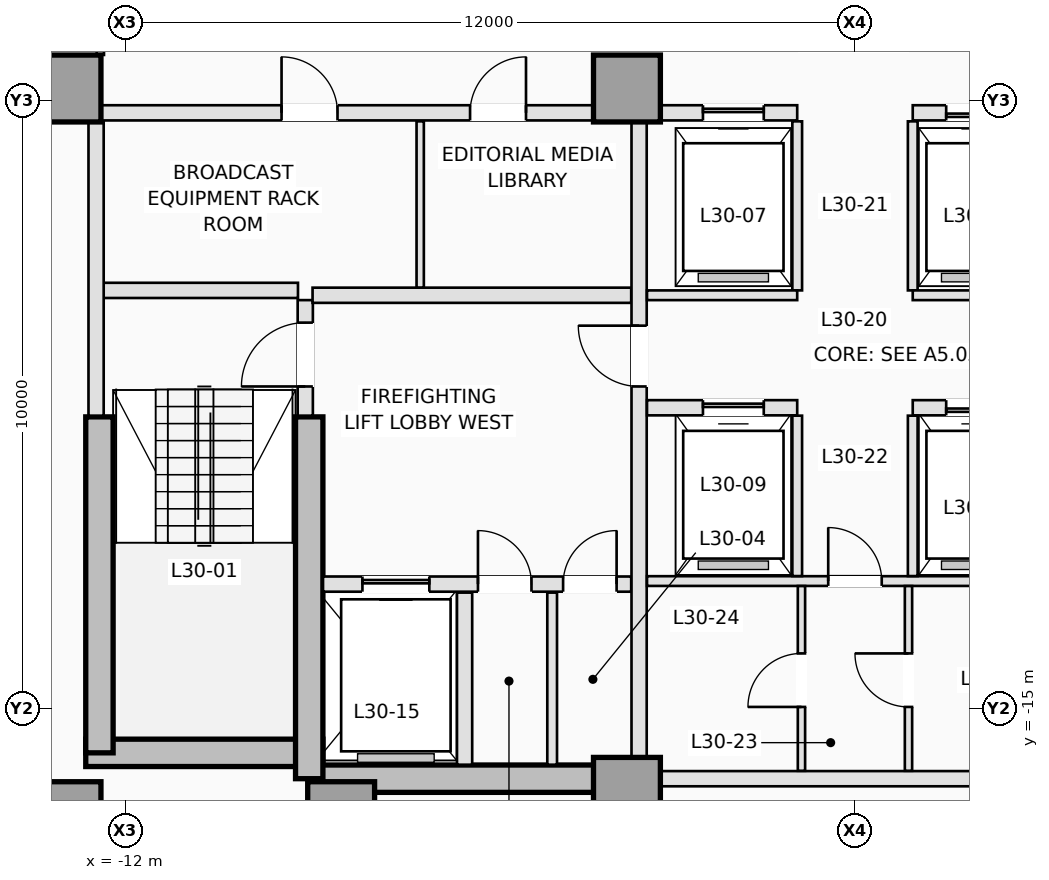
"""IFC4 building model, lengths in metres.
Left out: names, types, materials, properties, quantities, classifications, styles, units other than length and angle.
Written with IfcOpenShell. Run it as: python <this file> out.ifc"""

import sys

from ifc_helpers import new_model, si_unit, direction, frame, frame_2d, origin, origin_2d, place, context, subcontext, project, spatial, rectangle, extrude, element, fill, save


model = new_model("IFC4")
c1 = context("Model", 3, precision=1e-05, world=origin(), true_north=direction((0.0, 1.0)))
c2 = subcontext(c1, "Body", "Model", "MODEL_VIEW")
j1 = project(units=[si_unit("LENGTHUNIT", "METRE"), si_unit("PLANEANGLEUNIT", "RADIAN")], contexts=[c1])
p1 = place(None, origin())
s1 = spatial("IfcSite", under=j1, at=p1, CompositionType="ELEMENT")
p2 = place(p1, origin())
s2 = spatial("IfcBuilding", under=s1, at=p2, CompositionType="ELEMENT")
p3 = place(p2, frame((0.0, 0.0, 112.5)))
s3 = spatial("IfcBuildingStorey", under=s2, at=p3, CompositionType="ELEMENT", Elevation=112.5)
p4 = place(p3, frame((-12.65, -15.725, 0.0), z_axis=(0.0, 0.0, 1.0), x_axis=(1.0, 0.0, 0.0)))
e1 = element("IfcWall", 1, at=p4, inside=s3, PredefinedType="SHEAR", context=c2, shape_type="SweptSolid", body=[
    extrude(rectangle(XDim=3.9, YDim=0.45, at=frame_2d((1.95, 0.0))), origin(), (0.0, 0.0, 1.0), 3.5),
])
p5 = place(p3, frame((-8.975, -16.15, 0.0), z_axis=(0.0, 0.0, 1.0), x_axis=(1.0, 0.0, 0.0)))
e2 = element("IfcWall", 2, at=p5, inside=s3, PredefinedType="SHEAR", context=c2, shape_type="SweptSolid", body=[
    extrude(rectangle(XDim=5.225, YDim=0.45, at=frame_2d((2.613, 0.0))), origin(), (0.0, 0.0, 1.0), 3.5),
])
p6 = place(p3, frame((-12.425, -15.725, 0.0), z_axis=(0.0, 0.0, 1.0), x_axis=(0.0, 1.0, 0.0)))
e3 = element("IfcWall", 3, at=p6, inside=s3, PredefinedType="SHEAR", context=c2, shape_type="SweptSolid", body=[
    extrude(rectangle(XDim=5.525, YDim=0.45, at=frame_2d((2.763, 0.0))), origin(), (0.0, 0.0, 1.0), 3.5),
])
p7 = place(p3, frame((-8.975, -16.15, 0.0), z_axis=(0.0, 0.0, 1.0), x_axis=(0.0, 1.0, 0.0)))
e4 = element("IfcWall", 4, at=p7, inside=s3, PredefinedType="SHEAR", context=c2, shape_type="SweptSolid", body=[
    extrude(rectangle(XDim=5.95, YDim=0.45, at=frame_2d((2.975, 0.0))), origin(), (0.0, 0.0, 1.0), 3.5),
])
for number, where, z_axis, x_axis in (
    (5, (-12.95, -16.75, 0.0), (0.0, 0.0, 1.0), (1.0, 0.0, 0.0)),
    (6, (-8.45, -16.75, 0.0), (0.0, 0.0, 1.0), (1.0, 0.0, 0.0)),
    (7, (-3.75, -16.35, 0.0), (0.0, 0.0, 1.0), (1.0, 0.0, 0.0)),
    (8, (-12.95, -4.8, 0.0), (0.0, 0.0, 1.0), (1.0, 0.0, 0.0)),
    (9, (-3.75, -4.8, 0.0), (0.0, 0.0, 1.0), (1.0, 0.0, 0.0)),
):
    element("IfcColumn", number, at=place(p3, frame(where, z_axis=z_axis, x_axis=x_axis)), inside=s3, PredefinedType="COLUMN", context=c2, shape_type="SweptSolid", body=[
        extrude(rectangle(XDim=1.1, YDim=1.1, at=origin_2d()), origin(), (0.0, 0.0, 1.0), 3.5),
    ])
p8 = place(p3, frame((-9.04, -10.18, 0.0), z_axis=(0.0, 0.0, 1.0), x_axis=(0.0, 1.0, 0.0)))
e10 = element("IfcWall", 10, at=p8, inside=s3, PredefinedType="PARTITIONING", context=c2, shape_type="SweptSolid", body=[
    extrude(rectangle(XDim=1.9, YDim=0.25, at=frame_2d((0.95, 0.0))), origin(), (0.0, 0.0, 1.0), 3.25),
])
p9 = place(p8, frame((0.48, 0.0, 0.0)))
e11 = element("IfcOpeningElement", 11, at=p9, cuts=e10, PredefinedType="OPENING", context=c2, shape_type="SweptSolid", body=[
    extrude(rectangle(XDim=1.05, YDim=2.15, at=frame_2d((0.525, 1.075))), frame((0.0, 0.135, 0.0), z_axis=(0.0, -1.0, 0.0), x_axis=(1.0, 0.0, 0.0)), (0.0, 0.0, 1.0), 0.27),
])
p10 = place(p3, frame((-12.38, -8.12, 0.0), z_axis=(0.0, 0.0, 1.0), x_axis=(1.0, 0.0, 0.0)))
e12 = element("IfcWall", 12, at=p10, inside=s3, PredefinedType="PARTITIONING", context=c2, shape_type="SweptSolid", body=[
    extrude(rectangle(XDim=3.22, YDim=0.25, at=frame_2d((1.61, 0.0))), origin(), (0.0, 0.0, 1.0), 3.25),
])
p11 = place(p3, frame((-12.48, -10.18, 0.0), z_axis=(0.0, 0.0, 1.0), x_axis=(0.0, 1.0, 0.0)))
e13 = element("IfcWall", 13, at=p11, inside=s3, PredefinedType="PARTITIONING", context=c2, shape_type="SweptSolid", body=[
    extrude(rectangle(XDim=4.828, YDim=0.25, at=frame_2d((2.414, 0.0))), origin(), (0.0, 0.0, 1.0), 3.25),
])
p12 = place(p3, frame((-8.748, -12.95, 0.0), z_axis=(0.0, 0.0, 1.0), x_axis=(1.0, 0.0, 0.0)))
e14 = element("IfcWall", 14, at=p12, inside=s3, PredefinedType="PARTITIONING", context=c2, shape_type="SweptSolid", body=[
    extrude(rectangle(XDim=5.068, YDim=0.25, at=frame_2d((2.534, 0.0))), origin(), (0.0, 0.0, 1.0), 3.25),
])
p13 = place(p12, frame((0.648, 0.0, 0.0)))
e15 = element("IfcOpeningElement", 15, at=p13, cuts=e14, PredefinedType="OPENING", context=c2, shape_type="SweptSolid", body=[
    extrude(rectangle(XDim=1.1, YDim=2.15, at=frame_2d((0.55, 1.075))), frame((0.0, 0.135, 0.0), z_axis=(0.0, -1.0, 0.0), x_axis=(1.0, 0.0, 0.0)), (0.0, 0.0, 1.0), 0.27),
])
p14 = place(p12, frame((2.548, 0.0, 0.0)))
e16 = element("IfcOpeningElement", 16, at=p14, cuts=e14, PredefinedType="OPENING", context=c2, shape_type="SweptSolid", body=[
    extrude(rectangle(XDim=0.88, YDim=2.1, at=frame_2d((0.44, 1.05))), frame((0.0, 0.135, 0.0), z_axis=(0.0, -1.0, 0.0), x_axis=(1.0, 0.0, 0.0)), (0.0, 0.0, 1.0), 0.27),
])
p15 = place(p12, frame((3.948, 0.0, 0.0)))
e17 = element("IfcOpeningElement", 17, at=p15, cuts=e14, PredefinedType="OPENING", context=c2, shape_type="SweptSolid", body=[
    extrude(rectangle(XDim=0.88, YDim=2.1, at=frame_2d((0.44, 1.05))), frame((0.0, 0.135, 0.0), z_axis=(0.0, -1.0, 0.0), x_axis=(1.0, 0.0, 0.0)), (0.0, 0.0, 1.0), 0.27),
])
p16 = place(p3, frame((-6.42, -15.92, 0.0), z_axis=(0.0, 0.0, 1.0), x_axis=(0.0, 1.0, 0.0)))
e18 = element("IfcWall", 18, at=p16, inside=s3, PredefinedType="PARTITIONING", context=c2, shape_type="SweptSolid", body=[
    extrude(rectangle(XDim=2.83, YDim=0.25, at=frame_2d((1.415, 0.0))), origin(), (0.0, 0.0, 1.0), 3.25),
])
p17 = place(p3, frame((-4.98, -15.92, 0.0), z_axis=(0.0, 0.0, 1.0), x_axis=(0.0, 1.0, 0.0)))
e19 = element("IfcWall", 19, at=p17, inside=s3, PredefinedType="PARTITIONING", context=c2, shape_type="SweptSolid", body=[
    extrude(rectangle(XDim=2.83, YDim=0.16, at=frame_2d((1.415, 0.0))), origin(), (0.0, 0.0, 1.0), 3.25),
])
p18 = place(p3, frame((-8.92, -8.2, 0.0), z_axis=(0.0, 0.0, 1.0), x_axis=(1.0, 0.0, 0.0)))
e20 = element("IfcWall", 20, at=p18, inside=s3, PredefinedType="PARTITIONING", context=c2, shape_type="SweptSolid", body=[
    extrude(rectangle(XDim=5.24, YDim=0.25, at=frame_2d((2.62, 0.0))), origin(), (0.0, 0.0, 1.0), 3.25),
])
p19 = place(p3, frame((-3.55, -15.798, 0.0), z_axis=(0.0, 0.0, 1.0), x_axis=(0.0, 1.0, 0.0)))
e21 = element("IfcWall", 21, at=p19, inside=s3, PredefinedType="PARTITIONING", context=c2, shape_type="SweptSolid", body=[
    extrude(rectangle(XDim=10.446, YDim=0.25, at=frame_2d((5.223, 0.0))), origin(), (0.0, 0.0, 1.0), 3.25),
])
p20 = place(p19, frame((6.098, 0.0, 0.0)))
e22 = element("IfcOpeningElement", 22, at=p20, cuts=e21, PredefinedType="OPENING", context=c2, shape_type="SweptSolid", body=[
    extrude(rectangle(XDim=1.0, YDim=2.15, at=frame_2d((0.5, 1.075))), frame((0.0, 0.135, 0.0), z_axis=(0.0, -1.0, 0.0), x_axis=(1.0, 0.0, 0.0)), (0.0, 0.0, 1.0), 0.27),
])
p21 = place(p3, frame((-12.398, -5.2, 0.0), z_axis=(0.0, 0.0, 1.0), x_axis=(1.0, 0.0, 0.0)))
e23 = element("IfcWall", 23, at=p21, inside=s3, PredefinedType="PARTITIONING", context=c2, shape_type="SweptSolid", body=[
    extrude(rectangle(XDim=8.096, YDim=0.25, at=frame_2d((4.048, 0.0))), origin(), (0.0, 0.0, 1.0), 3.25),
])
p22 = place(p21, frame((2.968, 0.0, 0.0)))
e24 = element("IfcOpeningElement", 24, at=p22, cuts=e23, PredefinedType="OPENING", context=c2, shape_type="SweptSolid", body=[
    extrude(rectangle(XDim=0.92, YDim=2.12, at=frame_2d((0.46, 1.06))), frame((0.0, 0.135, 0.0), z_axis=(0.0, -1.0, 0.0), x_axis=(1.0, 0.0, 0.0)), (0.0, 0.0, 1.0), 0.27),
])
p23 = place(p21, frame((6.068, 0.0, 0.0)))
e25 = element("IfcOpeningElement", 25, at=p23, cuts=e23, PredefinedType="OPENING", context=c2, shape_type="SweptSolid", body=[
    extrude(rectangle(XDim=0.92, YDim=2.12, at=frame_2d((0.46, 1.06))), frame((0.0, 0.135, 0.0), z_axis=(0.0, -1.0, 0.0), x_axis=(1.0, 0.0, 0.0)), (0.0, 0.0, 1.0), 0.27),
])
p24 = place(p3, frame((-3.198, -5.2, 0.0), z_axis=(0.0, 0.0, 1.0), x_axis=(1.0, 0.0, 0.0)))
e26 = element("IfcWall", 26, at=p24, inside=s3, PredefinedType="PARTITIONING", context=c2, shape_type="SweptSolid", body=[
    extrude(rectangle(XDim=2.248, YDim=0.25, at=frame_2d((1.124, 0.0))), origin(), (0.0, 0.0, 1.0), 3.25),
])
p25 = place(p24, frame((0.698, 0.0, 0.0)))
e27 = element("IfcOpeningElement", 27, at=p25, cuts=e26, PredefinedType="OPENING", context=c2, shape_type="SweptSolid", body=[
    extrude(rectangle(XDim=1.0, YDim=2.15, at=frame_2d((0.5, 1.075))), frame((0.0, 0.135, 0.0), z_axis=(0.0, -1.0, 0.0), x_axis=(1.0, 0.0, 0.0)), (0.0, 0.0, 1.0), 0.27),
])
p26 = place(p3, frame((0.95, -5.2, 0.0), z_axis=(0.0, 0.0, 1.0), x_axis=(1.0, 0.0, 0.0)))
e28 = element("IfcWall", 28, at=p26, inside=s3, PredefinedType="PARTITIONING", context=c2, shape_type="SweptSolid", body=[
    extrude(rectangle(XDim=2.248, YDim=0.25, at=frame_2d((1.124, 0.0))), origin(), (0.0, 0.0, 1.0), 3.25),
])
p27 = place(p26, frame((0.55, 0.0, 0.0)))
e29 = element("IfcOpeningElement", 29, at=p27, cuts=e28, PredefinedType="OPENING", context=c2, shape_type="SweptSolid", body=[
    extrude(rectangle(XDim=1.0, YDim=2.15, at=frame_2d((0.5, 1.075))), frame((0.0, 0.135, 0.0), z_axis=(0.0, -1.0, 0.0), x_axis=(1.0, 0.0, 0.0)), (0.0, 0.0, 1.0), 0.27),
])
p28 = place(p3, frame((-7.15, -8.073, 0.0), z_axis=(0.0, 0.0, 1.0), x_axis=(0.0, 1.0, 0.0)))
e30 = element("IfcWall", 30, at=p28, inside=s3, PredefinedType="PARTITIONING", context=c2, shape_type="SweptSolid", body=[
    extrude(rectangle(XDim=2.733, YDim=0.12, at=frame_2d((1.366, 0.0))), origin(), (0.0, 0.0, 1.0), 3.25),
])
p29 = place(p3, frame((-3.198, -16.15, 0.0), z_axis=(0.0, 0.0, 1.0), x_axis=(1.0, 0.0, 0.0)))
e31 = element("IfcWall", 31, at=p29, inside=s3, PredefinedType="PARTITIONING", context=c2, shape_type="SweptSolid", body=[
    extrude(rectangle(XDim=6.396, YDim=0.25, at=frame_2d((3.198, 0.0))), origin(), (0.0, 0.0, 1.0), 2.3),
])
for number, where, z_axis, x_axis in (
    (32, (-0.95, -8.12, 0.0), (0.0, 0.0, 1.0), (0.0, 1.0, 0.0)),
    (33, (0.95, -8.12, 0.0), (0.0, 0.0, 1.0), (0.0, 1.0, 0.0)),
):
    element("IfcWall", number, at=place(p3, frame(where, z_axis=z_axis, x_axis=x_axis)), inside=s3, PredefinedType="PARTITIONING", context=c2, shape_type="SweptSolid", body=[
        extrude(rectangle(XDim=2.78, YDim=0.16, at=frame_2d((1.39, 0.0))), origin(), (0.0, 0.0, 1.0), 3.25),
    ])
for number, where, z_axis, x_axis in (
    (34, (-3.42, -8.2, 0.0), (0.0, 0.0, 1.0), (1.0, 0.0, 0.0)),
    (35, (0.95, -8.2, 0.0), (0.0, 0.0, 1.0), (1.0, 0.0, 0.0)),
):
    element("IfcWall", number, at=place(p3, frame(where, z_axis=z_axis, x_axis=x_axis)), inside=s3, PredefinedType="PARTITIONING", context=c2, shape_type="SweptSolid", body=[
        extrude(rectangle(XDim=2.47, YDim=0.16, at=frame_2d((1.235, 0.0))), origin(), (0.0, 0.0, 1.0), 3.25),
    ])
p30 = place(p3, frame((-3.42, -10.05, 0.0), z_axis=(0.0, 0.0, 1.0), x_axis=(1.0, 0.0, 0.0)))
e36 = element("IfcWall", 36, at=p30, inside=s3, PredefinedType="PARTITIONING", context=c2, shape_type="SweptSolid", body=[
    extrude(rectangle(XDim=2.47, YDim=0.25, at=frame_2d((1.235, 0.0))), origin(), (0.0, 0.0, 1.0), 3.25),
])
p31 = place(p30, frame((0.92, 0.0, 0.0)))
e37 = element("IfcOpeningElement", 37, at=p31, cuts=e36, PredefinedType="OPENING", context=c2, shape_type="SweptSolid", body=[
    extrude(rectangle(XDim=1.0, YDim=2.15, at=frame_2d((0.5, 1.075))), frame((0.0, 0.135, 0.0), z_axis=(0.0, -1.0, 0.0), x_axis=(1.0, 0.0, 0.0)), (0.0, 0.0, 1.0), 0.27),
])
p32 = place(p3, frame((0.95, -10.05, 0.0), z_axis=(0.0, 0.0, 1.0), x_axis=(1.0, 0.0, 0.0)))
e38 = element("IfcWall", 38, at=p32, inside=s3, PredefinedType="PARTITIONING", context=c2, shape_type="SweptSolid", body=[
    extrude(rectangle(XDim=2.47, YDim=0.25, at=frame_2d((1.235, 0.0))), origin(), (0.0, 0.0, 1.0), 3.25),
])
p33 = place(p32, frame((0.55, 0.0, 0.0)))
e39 = element("IfcOpeningElement", 39, at=p33, cuts=e38, PredefinedType="OPENING", context=c2, shape_type="SweptSolid", body=[
    extrude(rectangle(XDim=1.0, YDim=2.15, at=frame_2d((0.5, 1.075))), frame((0.0, 0.135, 0.0), z_axis=(0.0, -1.0, 0.0), x_axis=(1.0, 0.0, 0.0)), (0.0, 0.0, 1.0), 0.27),
])
p34 = place(p3, frame((-3.42, -12.9, 0.0), z_axis=(0.0, 0.0, 1.0), x_axis=(1.0, 0.0, 0.0)))
e40 = element("IfcWall", 40, at=p34, inside=s3, PredefinedType="PARTITIONING", context=c2, shape_type="SweptSolid", body=[
    extrude(rectangle(XDim=6.84, YDim=0.16, at=frame_2d((3.42, 0.0))), origin(), (0.0, 0.0, 1.0), 3.25),
])
p35 = place(p34, frame((2.98, 0.0, 0.0)))
e41 = element("IfcOpeningElement", 41, at=p35, cuts=e40, PredefinedType="OPENING", context=c2, shape_type="SweptSolid", body=[
    extrude(rectangle(XDim=0.88, YDim=2.12, at=frame_2d((0.44, 1.06))), frame((0.0, 0.09, 0.0), z_axis=(0.0, -1.0, 0.0), x_axis=(1.0, 0.0, 0.0)), (0.0, 0.0, 1.0), 0.18),
])
for number, where, z_axis, x_axis in (
    (42, (-0.95, -12.818, 0.0), (0.0, 0.0, 1.0), (0.0, 1.0, 0.0)),
    (43, (0.95, -12.818, 0.0), (0.0, 0.0, 1.0), (0.0, 1.0, 0.0)),
):
    element("IfcWall", number, at=place(p3, frame(where, z_axis=z_axis, x_axis=x_axis)), inside=s3, PredefinedType="PARTITIONING", context=c2, shape_type="SweptSolid", body=[
        extrude(rectangle(XDim=2.638, YDim=0.16, at=frame_2d((1.319, 0.0))), origin(), (0.0, 0.0, 1.0), 3.25),
    ])
p36 = place(p3, frame((-0.88, -16.02, 0.0), z_axis=(0.0, 0.0, 1.0), x_axis=(0.0, 1.0, 0.0)))
e44 = element("IfcWall", 44, at=p36, inside=s3, PredefinedType="PARTITIONING", context=c2, shape_type="SweptSolid", body=[
    extrude(rectangle(XDim=3.038, YDim=0.12, at=frame_2d((1.519, 0.0))), origin(), (0.0, 0.0, 1.0), 3.25),
])
p37 = place(p36, frame((1.05, 0.0, 0.0)))
e45 = element("IfcOpeningElement", 45, at=p37, cuts=e44, PredefinedType="OPENING", context=c2, shape_type="SweptSolid", body=[
    extrude(rectangle(XDim=0.88, YDim=2.12, at=frame_2d((0.44, 1.06))), frame((0.0, 0.07, 0.0), z_axis=(0.0, -1.0, 0.0), x_axis=(1.0, 0.0, 0.0)), (0.0, 0.0, 1.0), 0.14),
])
p38 = place(p3, frame((0.88, -16.02, 0.0), z_axis=(0.0, 0.0, 1.0), x_axis=(0.0, 1.0, 0.0)))
e46 = element("IfcWall", 46, at=p38, inside=s3, PredefinedType="PARTITIONING", context=c2, shape_type="SweptSolid", body=[
    extrude(rectangle(XDim=3.038, YDim=0.12, at=frame_2d((1.519, 0.0))), origin(), (0.0, 0.0, 1.0), 3.25),
])
p39 = place(p38, frame((1.05, 0.0, 0.0)))
e47 = element("IfcOpeningElement", 47, at=p39, cuts=e46, PredefinedType="OPENING", context=c2, shape_type="SweptSolid", body=[
    extrude(rectangle(XDim=0.88, YDim=2.12, at=frame_2d((0.44, 1.06))), frame((0.0, 0.07, 0.0), z_axis=(0.0, -1.0, 0.0), x_axis=(1.0, 0.0, 0.0)), (0.0, 0.0, 1.0), 0.14),
])
p40 = place(p3, frame((-12.41, -4.248, 0.0), z_axis=(0.0, 0.0, 1.0), x_axis=(0.0, 1.0, 0.0)))
e48 = element("IfcWall", 48, at=p40, inside=s3, PredefinedType="PARTITIONING", context=c2, shape_type="SweptSolid", body=[
    extrude(rectangle(XDim=1.848, YDim=0.12, at=frame_2d((0.924, 0.0))), origin(), (0.0, 0.0, 1.0), 3.25),
])
p41 = place(p25, origin())
e49 = element("IfcDoor", 49, at=p41, inside=s3, OperationType="SLIDING_TO_LEFT", PredefinedType="DOOR", context=c2, shape_type="SweptSolid", body=[
    extrude(rectangle(XDim=1.0, YDim=2.15, at=frame_2d((0.5, 1.075))), frame((0.0, 0.025, 0.0), z_axis=(0.0, -1.0, 0.0), x_axis=(1.0, 0.0, 0.0)), (0.0, 0.0, 1.0), 0.05),
])
fill(e27, e49)
p42 = place(p27, origin())
e50 = element("IfcDoor", 50, at=p42, inside=s3, OperationType="SLIDING_TO_RIGHT", PredefinedType="DOOR", context=c2, shape_type="SweptSolid", body=[
    extrude(rectangle(XDim=1.0, YDim=2.15, at=frame_2d((0.5, 1.075))), frame((0.0, 0.025, 0.0), z_axis=(0.0, -1.0, 0.0), x_axis=(1.0, 0.0, 0.0)), (0.0, 0.0, 1.0), 0.05),
])
fill(e29, e50)
p43 = place(p13, origin())
e51 = element("IfcDoor", 51, at=p43, inside=s3, OperationType="SLIDING_TO_LEFT", PredefinedType="DOOR", context=c2, shape_type="SweptSolid", body=[
    extrude(rectangle(XDim=1.1, YDim=2.15, at=frame_2d((0.55, 1.075))), frame((0.0, 0.025, 0.0), z_axis=(0.0, -1.0, 0.0), x_axis=(1.0, 0.0, 0.0)), (0.0, 0.0, 1.0), 0.05),
])
fill(e15, e51)
p44 = place(p31, origin())
e52 = element("IfcDoor", 52, at=p44, inside=s3, OperationType="SLIDING_TO_LEFT", PredefinedType="DOOR", context=c2, shape_type="SweptSolid", body=[
    extrude(rectangle(XDim=1.0, YDim=2.15, at=frame_2d((0.5, 1.075))), frame((0.0, 0.025, 0.0), z_axis=(0.0, -1.0, 0.0), x_axis=(1.0, 0.0, 0.0)), (0.0, 0.0, 1.0), 0.05),
])
fill(e37, e52)
p45 = place(p33, origin())
e53 = element("IfcDoor", 53, at=p45, inside=s3, OperationType="SLIDING_TO_RIGHT", PredefinedType="DOOR", context=c2, shape_type="SweptSolid", body=[
    extrude(rectangle(XDim=1.0, YDim=2.15, at=frame_2d((0.5, 1.075))), frame((0.0, 0.025, 0.0), z_axis=(0.0, -1.0, 0.0), x_axis=(1.0, 0.0, 0.0)), (0.0, 0.0, 1.0), 0.05),
])
fill(e39, e53)
p46 = place(p9, origin())
e54 = element("IfcDoor", 54, at=p46, inside=s3, OperationType="SINGLE_SWING_LEFT", PredefinedType="DOOR", context=c2, shape_type="SweptSolid", body=[
    extrude(rectangle(XDim=1.05, YDim=2.15, at=frame_2d((0.525, 1.075))), frame((0.0, 0.025, 0.0), z_axis=(0.0, -1.0, 0.0), x_axis=(1.0, 0.0, 0.0)), (0.0, 0.0, 1.0), 0.05),
])
fill(e11, e54)
p47 = place(p14, origin())
e55 = element("IfcDoor", 55, at=p47, inside=s3, OperationType="SINGLE_SWING_LEFT", PredefinedType="TRAPDOOR", context=c2, shape_type="SweptSolid", body=[
    extrude(rectangle(XDim=0.88, YDim=2.1, at=frame_2d((0.44, 1.05))), frame((0.0, 0.025, 0.0), z_axis=(0.0, -1.0, 0.0), x_axis=(1.0, 0.0, 0.0)), (0.0, 0.0, 1.0), 0.05),
])
fill(e16, e55)
p48 = place(p15, origin())
e56 = element("IfcDoor", 56, at=p48, inside=s3, OperationType="SINGLE_SWING_RIGHT", PredefinedType="TRAPDOOR", context=c2, shape_type="SweptSolid", body=[
    extrude(rectangle(XDim=0.88, YDim=2.1, at=frame_2d((0.44, 1.05))), frame((0.0, 0.025, 0.0), z_axis=(0.0, -1.0, 0.0), x_axis=(1.0, 0.0, 0.0)), (0.0, 0.0, 1.0), 0.05),
])
fill(e17, e56)
p49 = place(p20, origin())
e57 = element("IfcDoor", 57, at=p49, inside=s3, OperationType="SINGLE_SWING_RIGHT", PredefinedType="DOOR", context=c2, shape_type="SweptSolid", body=[
    extrude(rectangle(XDim=1.0, YDim=2.15, at=frame_2d((0.5, 1.075))), frame((0.0, 0.025, 0.0), z_axis=(0.0, -1.0, 0.0), x_axis=(1.0, 0.0, 0.0)), (0.0, 0.0, 1.0), 0.05),
])
fill(e22, e57)
p50 = place(p22, origin())
e58 = element("IfcDoor", 58, at=p50, inside=s3, OperationType="SINGLE_SWING_LEFT", PredefinedType="DOOR", context=c2, shape_type="SweptSolid", body=[
    extrude(rectangle(XDim=0.92, YDim=2.12, at=frame_2d((0.46, 1.06))), frame((0.0, 0.025, 0.0), z_axis=(0.0, -1.0, 0.0), x_axis=(1.0, 0.0, 0.0)), (0.0, 0.0, 1.0), 0.05),
])
fill(e24, e58)
p51 = place(p23, origin())
e59 = element("IfcDoor", 59, at=p51, inside=s3, OperationType="SINGLE_SWING_RIGHT", PredefinedType="DOOR", context=c2, shape_type="SweptSolid", body=[
    extrude(rectangle(XDim=0.92, YDim=2.12, at=frame_2d((0.46, 1.06))), frame((0.0, 0.025, 0.0), z_axis=(0.0, -1.0, 0.0), x_axis=(1.0, 0.0, 0.0)), (0.0, 0.0, 1.0), 0.05),
])
fill(e25, e59)
p52 = place(p35, origin())
e60 = element("IfcDoor", 60, at=p52, inside=s3, OperationType="SINGLE_SWING_LEFT", PredefinedType="DOOR", context=c2, shape_type="SweptSolid", body=[
    extrude(rectangle(XDim=0.88, YDim=2.12, at=frame_2d((0.44, 1.06))), frame((0.0, 0.025, 0.0), z_axis=(0.0, -1.0, 0.0), x_axis=(1.0, 0.0, 0.0)), (0.0, 0.0, 1.0), 0.05),
])
fill(e41, e60)
p53 = place(p37, origin())
e61 = element("IfcDoor", 61, at=p53, inside=s3, OperationType="SINGLE_SWING_LEFT", PredefinedType="DOOR", context=c2, shape_type="SweptSolid", body=[
    extrude(rectangle(XDim=0.88, YDim=2.12, at=frame_2d((0.44, 1.06))), frame((0.0, 0.025, 0.0), z_axis=(0.0, -1.0, 0.0), x_axis=(1.0, 0.0, 0.0)), (0.0, 0.0, 1.0), 0.05),
])
fill(e45, e61)
p54 = place(p39, origin())
e62 = element("IfcDoor", 62, at=p54, inside=s3, OperationType="SINGLE_SWING_RIGHT", PredefinedType="DOOR", context=c2, shape_type="SweptSolid", body=[
    extrude(rectangle(XDim=0.88, YDim=2.12, at=frame_2d((0.44, 1.06))), frame((0.0, 0.025, 0.0), z_axis=(0.0, -1.0, 0.0), x_axis=(1.0, 0.0, 0.0)), (0.0, 0.0, 1.0), 0.05),
])
fill(e47, e62)
save(model, sys.argv[1])
